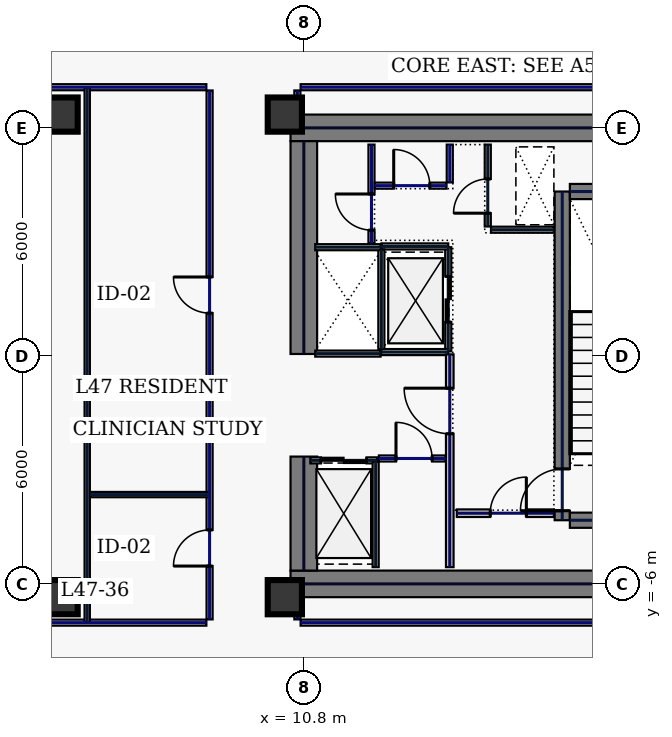
"""IFC4 building model, lengths in metres.
Left out: names, types, materials, properties, quantities, classifications, styles, units other than length and angle.
Written with IfcOpenShell. Run it as: python <this file> out.ifc"""

import sys

from ifc_helpers import new_model, si_unit, direction, frame, frame_2d, origin, origin_2d, place, context, subcontext, project, spatial, rectangle, hollow_rectangle, extrude, element, fill, save


model = new_model("IFC4")
c1 = context("Model", 3, precision=1e-05, world=origin(), true_north=direction((0.0, 1.0)))
c2 = subcontext(c1, "Body", "Model", "MODEL_VIEW")
j1 = project(units=[si_unit("LENGTHUNIT", "METRE"), si_unit("PLANEANGLEUNIT", "RADIAN")], contexts=[c1])
p1 = place(None, origin())
s1 = spatial("IfcSite", under=j1, at=p1, CompositionType="ELEMENT")
p2 = place(p1, origin())
s2 = spatial("IfcBuilding", under=s1, at=p2, CompositionType="ELEMENT")
p3 = place(p2, frame((0.0, 0.0, 204.2)))
s3 = spatial("IfcBuildingStorey", under=s2, at=p3, CompositionType="ELEMENT", Elevation=204.2)
for number, where, z_axis, x_axis in (
    (1, (10.45, 6.0, 0.0), (0.0, 0.0, 1.0), (1.0, 0.0, 0.0)),
    (2, (10.45, -6.0, 0.0), (0.0, 0.0, 1.0), (1.0, 0.0, 0.0)),
):
    element("IfcWall", number, at=place(p3, frame(where, z_axis=z_axis, x_axis=x_axis)), inside=s3, PredefinedType="SHEAR", context=c2, shape_type="SweptSolid", body=[
        extrude(rectangle(XDim=11.55, YDim=0.7, at=frame_2d((5.775, 0.0))), origin(), (0.0, 0.0, 1.0), 3.68),
    ])
p4 = place(p3, frame((10.8, -5.65, 0.0), z_axis=(0.0, 0.0, 1.0), x_axis=(0.0, 1.0, 0.0)))
e3 = element("IfcWall", 3, at=p4, inside=s3, PredefinedType="SHEAR", context=c2, shape_type="SweptSolid", body=[
    extrude(rectangle(XDim=3.0, YDim=0.7, at=frame_2d((1.5, 0.0))), origin(), (0.0, 0.0, 1.0), 3.68),
])
p5 = place(p3, frame((10.8, 0.05, 0.0), z_axis=(0.0, 0.0, 1.0), x_axis=(0.0, 1.0, 0.0)))
e4 = element("IfcWall", 4, at=p5, inside=s3, PredefinedType="SHEAR", context=c2, shape_type="SweptSolid", body=[
    extrude(rectangle(XDim=5.6, YDim=0.7, at=frame_2d((2.8, 0.0))), origin(), (0.0, 0.0, 1.0), 3.68),
])
p6 = place(p3, frame((17.6, -4.325, 0.0), z_axis=(0.0, 0.0, 1.0), x_axis=(0.0, 1.0, 0.0)))
e5 = element("IfcWall", 5, at=p6, inside=s3, PredefinedType="SHEAR", context=c2, shape_type="SweptSolid", body=[
    extrude(rectangle(XDim=8.65, YDim=0.4, at=frame_2d((4.325, 0.0))), origin(), (0.0, 0.0, 1.0), 3.68),
])
p7 = place(p6, frame((0.25, 0.0, 0.0)))
e6 = element("IfcOpeningElement", 6, at=p7, cuts=e5, PredefinedType="OPENING", context=c2, shape_type="SweptSolid", body=[
    extrude(rectangle(XDim=1.1, YDim=2.2, at=frame_2d((0.55, 1.1))), frame((0.0, 0.21, 0.0), z_axis=(0.0, -1.0, 0.0), x_axis=(1.0, 0.0, 0.0)), (0.0, 0.0, 1.0), 0.42),
])
for number, where, z_axis, x_axis in (
    (7, (17.8, -4.325, 0.0), (0.0, 0.0, 1.0), (1.0, 0.0, 0.0)),
    (8, (17.8, 4.325, 0.0), (0.0, 0.0, 1.0), (1.0, 0.0, 0.0)),
):
    element("IfcWall", number, at=place(p3, frame(where, z_axis=z_axis, x_axis=x_axis)), inside=s3, PredefinedType="SHEAR", context=c2, shape_type="SweptSolid", body=[
        extrude(rectangle(XDim=3.4, YDim=0.4, at=frame_2d((1.7, 0.0))), origin(), (0.0, 0.0, 1.0), 3.68),
    ])
for number, where, z_axis, x_axis in (
    (9, (10.3, -6.35, 0.0), (0.0, 0.0, 1.0), (1.0, 0.0, 0.0)),
    (10, (10.3, 6.35, 0.0), (0.0, 0.0, 1.0), (1.0, 0.0, 0.0)),
    (11, (4.4, -6.35, 0.0), (0.0, 0.0, 1.0), (1.0, 0.0, 0.0)),
    (12, (4.4, 6.35, 0.0), (0.0, 0.0, 1.0), (1.0, 0.0, 0.0)),
):
    element("IfcColumn", number, at=place(p3, frame(where, z_axis=z_axis, x_axis=x_axis)), inside=s3, PredefinedType="COLUMN", context=c2, shape_type="SweptSolid", body=[
        extrude(hollow_rectangle(XDim=0.9, YDim=0.9, WallThickness=0.04, at=origin_2d()), origin(), (0.0, 0.0, 1.0), 3.68),
    ])
p8 = place(p3, frame((14.6, 0.12, 0.0), z_axis=(0.0, 0.0, 1.0), x_axis=(0.0, 1.0, 0.0)))
e13 = element("IfcWall", 13, at=p8, inside=s3, PredefinedType="PARTITIONING", context=c2, shape_type="SweptSolid", body=[
    extrude(rectangle(XDim=2.74, YDim=0.16, at=frame_2d((1.37, 0.0))), origin(), (0.0, 0.0, 1.0), 3.68),
])
p9 = place(p8, frame((0.77, 0.0, 0.0)))
e14 = element("IfcOpeningElement", 14, at=p9, cuts=e13, PredefinedType="OPENING", context=c2, shape_type="SweptSolid", body=[
    extrude(rectangle(XDim=1.2, YDim=2.2, at=frame_2d((0.6, 1.1))), frame((0.0, 0.09, 0.0), z_axis=(0.0, -1.0, 0.0), x_axis=(1.0, 0.0, 0.0)), (0.0, 0.0, 1.0), 0.18),
])
for number, where, z_axis, x_axis in (
    (15, (12.84, 0.1, 0.0), (0.0, 0.0, 1.0), (1.0, 0.0, 0.0)),
    (16, (12.84, 2.88, 0.0), (0.0, 0.0, 1.0), (1.0, 0.0, 0.0)),
):
    element("IfcWall", number, at=place(p3, frame(where, z_axis=z_axis, x_axis=x_axis)), inside=s3, PredefinedType="PARTITIONING", context=c2, shape_type="SweptSolid", body=[
        extrude(rectangle(XDim=1.76, YDim=0.16, at=frame_2d((0.88, 0.0))), origin(), (0.0, 0.0, 1.0), 3.68),
    ])
p10 = place(p3, frame((12.84, 0.18, 0.0), z_axis=(0.0, 0.0, 1.0), x_axis=(0.0, 1.0, 0.0)))
e17 = element("IfcWall", 17, at=p10, inside=s3, PredefinedType="PARTITIONING", context=c2, shape_type="SweptSolid", body=[
    extrude(rectangle(XDim=2.62, YDim=0.16, at=frame_2d((1.31, 0.0))), origin(), (0.0, 0.0, 1.0), 3.68),
])
p11 = place(p3, frame((10.97, -2.75, 0.0), z_axis=(0.0, 0.0, 1.0), x_axis=(1.0, 0.0, 0.0)))
e18 = element("IfcWall", 18, at=p11, inside=s3, PredefinedType="PARTITIONING", context=c2, shape_type="SweptSolid", body=[
    extrude(rectangle(XDim=1.76, YDim=0.16, at=frame_2d((0.88, 0.0))), origin(), (0.0, 0.0, 1.0), 3.68),
])
p12 = place(p11, frame((0.28, 0.0, 0.0)))
e19 = element("IfcOpeningElement", 19, at=p12, cuts=e18, PredefinedType="OPENING", context=c2, shape_type="SweptSolid", body=[
    extrude(rectangle(XDim=1.2, YDim=2.2, at=frame_2d((0.6, 1.1))), frame((0.0, 0.09, 0.0), z_axis=(0.0, -1.0, 0.0), x_axis=(1.0, 0.0, 0.0)), (0.0, 0.0, 1.0), 0.18),
])
for number, where, z_axis, x_axis in (
    (20, (11.1, 0.06, 0.0), (0.0, 0.0, 1.0), (1.0, 0.0, 0.0)),
    (21, (11.1, 2.86, 0.0), (0.0, 0.0, 1.0), (1.0, 0.0, 0.0)),
):
    element("IfcWall", number, at=place(p3, frame(where, z_axis=z_axis, x_axis=x_axis)), inside=s3, PredefinedType="PARTITIONING", context=c2, shape_type="SweptSolid", body=[
        extrude(rectangle(XDim=1.72, YDim=0.16, at=frame_2d((0.86, 0.0))), origin(), (0.0, 0.0, 1.0), 3.68),
    ])
p13 = place(p3, frame((15.64, 3.405, 0.0), z_axis=(0.0, 0.0, 1.0), x_axis=(0.0, 1.0, 0.0)))
e22 = element("IfcWall", 22, at=p13, inside=s3, PredefinedType="PARTITIONING", context=c2, shape_type="SweptSolid", body=[
    extrude(rectangle(XDim=2.155, YDim=0.16, at=frame_2d((1.078, 0.0))), origin(), (0.0, 0.0, 1.0), 3.68),
])
p14 = place(p13, frame((0.35, 0.0, 0.0)))
e23 = element("IfcOpeningElement", 23, at=p14, cuts=e22, PredefinedType="OPENING", context=c2, shape_type="SweptSolid", body=[
    extrude(rectangle(XDim=0.9, YDim=2.2, at=frame_2d((0.45, 1.1))), frame((0.0, 0.09, 0.0), z_axis=(0.0, -1.0, 0.0), x_axis=(1.0, 0.0, 0.0)), (0.0, 0.0, 1.0), 0.18),
])
p15 = place(p3, frame((15.725, 3.32, 0.0), z_axis=(0.0, 0.0, 1.0), x_axis=(1.0, 0.0, 0.0)))
e24 = element("IfcWall", 24, at=p15, inside=s3, PredefinedType="PARTITIONING", context=c2, shape_type="SweptSolid", body=[
    extrude(rectangle(XDim=1.655, YDim=0.16, at=frame_2d((0.827, 0.0))), origin(), (0.0, 0.0, 1.0), 3.68),
])
p16 = place(p3, frame((14.825, -4.14, 0.0), z_axis=(0.0, 0.0, 1.0), x_axis=(1.0, 0.0, 0.0)))
e25 = element("IfcWall", 25, at=p16, inside=s3, PredefinedType="SOLIDWALL", context=c2, shape_type="SweptSolid", body=[
    extrude(rectangle(XDim=2.555, YDim=0.2, at=frame_2d((1.277, 0.0))), origin(), (0.0, 0.0, 1.0), 3.68),
])
p17 = place(p16, frame((0.88, 0.0, 0.0)))
e26 = element("IfcOpeningElement", 26, at=p17, cuts=e25, PredefinedType="OPENING", context=c2, shape_type="SweptSolid", body=[
    extrude(rectangle(XDim=0.95, YDim=2.2, at=frame_2d((0.475, 1.1))), frame((0.0, 0.11, 0.0), z_axis=(0.0, -1.0, 0.0), x_axis=(1.0, 0.0, 0.0)), (0.0, 0.0, 1.0), 0.22),
])
p18 = place(p3, frame((12.775, -2.7, 0.0), z_axis=(0.0, 0.0, 1.0), x_axis=(1.0, 0.0, 0.0)))
e27 = element("IfcWall", 27, at=p18, inside=s3, PredefinedType="PARTITIONING", context=c2, shape_type="SweptSolid", body=[
    extrude(rectangle(XDim=1.76, YDim=0.16, at=frame_2d((0.88, 0.0))), origin(), (0.0, 0.0, 1.0), 3.68),
])
p19 = place(p18, frame((0.45, 0.0, 0.0)))
e28 = element("IfcOpeningElement", 28, at=p19, cuts=e27, PredefinedType="OPENING", context=c2, shape_type="SweptSolid", body=[
    extrude(rectangle(XDim=0.95, YDim=2.2, at=frame_2d((0.475, 1.1))), frame((0.0, 0.09, 0.0), z_axis=(0.0, -1.0, 0.0), x_axis=(1.0, 0.0, 0.0)), (0.0, 0.0, 1.0), 0.18),
])
p20 = place(p3, frame((12.69, -5.56, 0.0), z_axis=(0.0, 0.0, 1.0), x_axis=(0.0, 1.0, 0.0)))
e29 = element("IfcWall", 29, at=p20, inside=s3, PredefinedType="PARTITIONING", context=c2, shape_type="SweptSolid", body=[
    extrude(rectangle(XDim=2.775, YDim=0.16, at=frame_2d((1.388, 0.0))), origin(), (0.0, 0.0, 1.0), 3.68),
])
p21 = place(p3, frame((12.58, 2.96, 0.0), z_axis=(0.0, 0.0, 1.0), x_axis=(0.0, 1.0, 0.0)))
e30 = element("IfcWall", 30, at=p21, inside=s3, PredefinedType="PARTITIONING", context=c2, shape_type="SweptSolid", body=[
    extrude(rectangle(XDim=2.6, YDim=0.16, at=frame_2d((1.3, 0.0))), origin(), (0.0, 0.0, 1.0), 3.68),
])
p22 = place(p21, frame((0.35, 0.0, 0.0)))
e31 = element("IfcOpeningElement", 31, at=p22, cuts=e30, PredefinedType="OPENING", context=c2, shape_type="SweptSolid", body=[
    extrude(rectangle(XDim=0.95, YDim=2.2, at=frame_2d((0.475, 1.1))), frame((0.0, 0.09, 0.0), z_axis=(0.0, -1.0, 0.0), x_axis=(1.0, 0.0, 0.0)), (0.0, 0.0, 1.0), 0.18),
])
p23 = place(p3, frame((12.665, 4.48, 0.0), z_axis=(0.0, 0.0, 1.0), x_axis=(1.0, 0.0, 0.0)))
e32 = element("IfcWall", 32, at=p23, inside=s3, PredefinedType="PARTITIONING", context=c2, shape_type="SweptSolid", body=[
    extrude(rectangle(XDim=1.89, YDim=0.16, at=frame_2d((0.945, 0.0))), origin(), (0.0, 0.0, 1.0), 3.68),
])
p24 = place(p23, frame((0.5, 0.0, 0.0)))
e33 = element("IfcOpeningElement", 33, at=p24, cuts=e32, PredefinedType="OPENING", context=c2, shape_type="SweptSolid", body=[
    extrude(rectangle(XDim=0.95, YDim=2.2, at=frame_2d((0.475, 1.1))), frame((0.0, 0.09, 0.0), z_axis=(0.0, -1.0, 0.0), x_axis=(1.0, 0.0, 0.0)), (0.0, 0.0, 1.0), 0.18),
])
p25 = place(p3, frame((14.64, 4.565, 0.0), z_axis=(0.0, 0.0, 1.0), x_axis=(0.0, 1.0, 0.0)))
e34 = element("IfcWall", 34, at=p25, inside=s3, PredefinedType="PARTITIONING", context=c2, shape_type="SweptSolid", body=[
    extrude(rectangle(XDim=0.995, YDim=0.16, at=frame_2d((0.498, 0.0))), origin(), (0.0, 0.0, 1.0), 3.68),
])
p26 = place(p3, frame((14.64, -5.56, 0.0), z_axis=(0.0, 0.0, 1.0), x_axis=(0.0, 1.0, 0.0)))
e35 = element("IfcWall", 35, at=p26, inside=s3, PredefinedType="SOLIDWALL", context=c2, shape_type="SweptSolid", body=[
    extrude(rectangle(XDim=5.6, YDim=0.2, at=frame_2d((2.8, 0.0))), origin(), (0.0, 0.0, 1.0), 3.68),
])
p27 = place(p26, frame((3.51, 0.0, 0.0)))
e36 = element("IfcOpeningElement", 36, at=p27, cuts=e35, PredefinedType="OPENING", context=c2, shape_type="SweptSolid", body=[
    extrude(rectangle(XDim=1.2, YDim=2.2, at=frame_2d((0.6, 1.1))), frame((0.0, 0.11, 0.0), z_axis=(0.0, -1.0, 0.0), x_axis=(1.0, 0.0, 0.0)), (0.0, 0.0, 1.0), 0.22),
])
p28 = place(p3, frame((24.965, 7.07, 0.0), z_axis=(0.0, 0.0, 1.0), x_axis=(-1.0, 0.0, 0.0)))
e37 = element("IfcWall", 37, at=p28, inside=s3, PredefinedType="PARTITIONING", context=c2, shape_type="SweptSolid", body=[
    extrude(rectangle(XDim=14.25, YDim=0.16, at=frame_2d((7.125, 0.0))), origin(), (0.0, 0.0, 1.0), 3.68),
])
p29 = place(p3, frame((10.63, 6.985, 0.0), z_axis=(0.0, 0.0, 1.0), x_axis=(0.0, -1.0, 0.0)))
e38 = element("IfcWall", 38, at=p29, inside=s3, PredefinedType="PARTITIONING", context=c2, shape_type="SweptSolid", body=[
    extrude(rectangle(XDim=0.565, YDim=0.16, at=frame_2d((0.283, 0.0))), origin(), (0.0, 0.0, 1.0), 1.475),
])
p30 = place(p3, frame((10.63, -6.42, 0.0), z_axis=(0.0, 0.0, 1.0), x_axis=(0.0, -1.0, 0.0)))
e39 = element("IfcWall", 39, at=p30, inside=s3, PredefinedType="PARTITIONING", context=c2, shape_type="SweptSolid", body=[
    extrude(rectangle(XDim=0.515, YDim=0.16, at=frame_2d((0.258, 0.0))), origin(), (0.0, 0.0, 1.0), 1.475),
])
p31 = place(p3, frame((10.715, -7.02, 0.0), z_axis=(0.0, 0.0, 1.0), x_axis=(1.0, 0.0, 0.0)))
e40 = element("IfcWall", 40, at=p31, inside=s3, PredefinedType="PARTITIONING", context=c2, shape_type="SweptSolid", body=[
    extrude(rectangle(XDim=14.25, YDim=0.16, at=frame_2d((7.125, 0.0))), origin(), (0.0, 0.0, 1.0), 3.68),
])
for number, where, z_axis, x_axis in (
    (41, (8.235, 7.07, 0.0), (0.0, 0.0, 1.0), (-1.0, 0.0, 0.0)),
    (42, (1.415, -7.02, 0.0), (0.0, 0.0, 1.0), (1.0, 0.0, 0.0)),
):
    element("IfcWall", number, at=place(p3, frame(where, z_axis=z_axis, x_axis=x_axis)), inside=s3, PredefinedType="PARTITIONING", context=c2, shape_type="SweptSolid", body=[
        extrude(rectangle(XDim=6.82, YDim=0.16, at=frame_2d((3.41, 0.0))), origin(), (0.0, 0.0, 1.0), 3.68),
    ])
p32 = place(p3, frame((8.32, -6.935, 0.0), z_axis=(0.0, 0.0, 1.0), x_axis=(0.0, 1.0, 0.0)))
e43 = element("IfcWall", 43, at=p32, inside=s3, PredefinedType="PARTITIONING", context=c2, shape_type="SweptSolid", body=[
    extrude(rectangle(XDim=13.92, YDim=0.16, at=frame_2d((6.96, 0.0))), origin(), (0.0, 0.0, 1.0), 3.68),
])
p33 = place(p32, frame((1.404, 0.0, 0.0)))
e44 = element("IfcOpeningElement", 44, at=p33, cuts=e43, PredefinedType="OPENING", context=c2, shape_type="SweptSolid", body=[
    extrude(rectangle(XDim=0.95, YDim=2.2, at=frame_2d((0.475, 1.1))), frame((0.0, 0.09, 0.0), z_axis=(0.0, -1.0, 0.0), x_axis=(1.0, 0.0, 0.0)), (0.0, 0.0, 1.0), 0.18),
])
p34 = place(p32, frame((8.061, 0.0, 0.0)))
e45 = element("IfcOpeningElement", 45, at=p34, cuts=e43, PredefinedType="OPENING", context=c2, shape_type="SweptSolid", body=[
    extrude(rectangle(XDim=0.95, YDim=2.2, at=frame_2d((0.475, 1.1))), frame((0.0, 0.09, 0.0), z_axis=(0.0, -1.0, 0.0), x_axis=(1.0, 0.0, 0.0)), (0.0, 0.0, 1.0), 0.18),
])
p35 = place(p3, frame((5.1, -7.015, 0.0), z_axis=(0.0, 0.0, 1.0), x_axis=(0.0, 1.0, 0.0)))
e46 = element("IfcWall", 46, at=p35, inside=s3, PredefinedType="PARTITIONING", context=c2, shape_type="SweptSolid", body=[
    extrude(rectangle(XDim=14.08, YDim=0.14, at=frame_2d((7.04, 0.0))), origin(), (0.0, 0.0, 1.0), 3.68),
])
p36 = place(p3, frame((5.175, -3.65, 0.0), z_axis=(0.0, 0.0, 1.0), x_axis=(1.0, 0.0, 0.0)))
e47 = element("IfcWall", 47, at=p36, inside=s3, PredefinedType="PARTITIONING", context=c2, shape_type="SweptSolid", body=[
    extrude(rectangle(XDim=3.14, YDim=0.14, at=frame_2d((1.57, 0.0))), origin(), (0.0, 0.0, 1.0), 3.68),
])
p37 = place(p7, origin())
e48 = element("IfcDoor", 48, at=p37, inside=s3, OperationType="SINGLE_SWING_LEFT", PredefinedType="DOOR", context=c2, shape_type="SweptSolid", body=[
    extrude(rectangle(XDim=1.1, YDim=2.2, at=frame_2d((0.55, 1.1))), frame((0.0, 0.025, 0.0), z_axis=(0.0, -1.0, 0.0), x_axis=(1.0, 0.0, 0.0)), (0.0, 0.0, 1.0), 0.05),
])
fill(e6, e48)
p38 = place(p9, origin())
e49 = element("IfcDoor", 49, at=p38, inside=s3, OperationType="SLIDING_TO_LEFT", PredefinedType="DOOR", context=c2, shape_type="SweptSolid", body=[
    extrude(rectangle(XDim=1.2, YDim=2.2, at=frame_2d((0.6, 1.1))), frame((0.0, 0.025, 0.0), z_axis=(0.0, -1.0, 0.0), x_axis=(1.0, 0.0, 0.0)), (0.0, 0.0, 1.0), 0.05),
])
fill(e14, e49)
p39 = place(p12, origin())
e50 = element("IfcDoor", 50, at=p39, inside=s3, OperationType="SLIDING_TO_LEFT", PredefinedType="DOOR", context=c2, shape_type="SweptSolid", body=[
    extrude(rectangle(XDim=1.2, YDim=2.2, at=frame_2d((0.6, 1.1))), frame((0.0, 0.025, 0.0), z_axis=(0.0, -1.0, 0.0), x_axis=(1.0, 0.0, 0.0)), (0.0, 0.0, 1.0), 0.05),
])
fill(e19, e50)
p40 = place(p14, origin())
e51 = element("IfcDoor", 51, at=p40, inside=s3, OperationType="SINGLE_SWING_LEFT", PredefinedType="DOOR", context=c2, shape_type="SweptSolid", body=[
    extrude(rectangle(XDim=0.9, YDim=2.2, at=frame_2d((0.45, 1.1))), frame((0.0, 0.025, 0.0), z_axis=(0.0, -1.0, 0.0), x_axis=(1.0, 0.0, 0.0)), (0.0, 0.0, 1.0), 0.05),
])
fill(e23, e51)
p41 = place(p17, origin())
e52 = element("IfcDoor", 52, at=p41, inside=s3, OperationType="SINGLE_SWING_RIGHT", PredefinedType="DOOR", context=c2, shape_type="SweptSolid", body=[
    extrude(rectangle(XDim=0.95, YDim=2.2, at=frame_2d((0.475, 1.1))), frame((0.0, 0.025, 0.0), z_axis=(0.0, -1.0, 0.0), x_axis=(1.0, 0.0, 0.0)), (0.0, 0.0, 1.0), 0.05),
])
fill(e26, e52)
p42 = place(p19, origin())
e53 = element("IfcDoor", 53, at=p42, inside=s3, OperationType="SINGLE_SWING_LEFT", PredefinedType="DOOR", context=c2, shape_type="SweptSolid", body=[
    extrude(rectangle(XDim=0.95, YDim=2.2, at=frame_2d((0.475, 1.1))), frame((0.0, 0.025, 0.0), z_axis=(0.0, -1.0, 0.0), x_axis=(1.0, 0.0, 0.0)), (0.0, 0.0, 1.0), 0.05),
])
fill(e28, e53)
p43 = place(p22, origin())
e54 = element("IfcDoor", 54, at=p43, inside=s3, OperationType="SINGLE_SWING_RIGHT", PredefinedType="DOOR", context=c2, shape_type="SweptSolid", body=[
    extrude(rectangle(XDim=0.95, YDim=2.2, at=frame_2d((0.475, 1.1))), frame((0.0, 0.025, 0.0), z_axis=(0.0, -1.0, 0.0), x_axis=(1.0, 0.0, 0.0)), (0.0, 0.0, 1.0), 0.05),
])
fill(e31, e54)
p44 = place(p24, origin())
e55 = element("IfcDoor", 55, at=p44, inside=s3, OperationType="SINGLE_SWING_LEFT", PredefinedType="DOOR", context=c2, shape_type="SweptSolid", body=[
    extrude(rectangle(XDim=0.95, YDim=2.2, at=frame_2d((0.475, 1.1))), frame((0.0, 0.025, 0.0), z_axis=(0.0, -1.0, 0.0), x_axis=(1.0, 0.0, 0.0)), (0.0, 0.0, 1.0), 0.05),
])
fill(e33, e55)
p45 = place(p27, origin())
e56 = element("IfcDoor", 56, at=p45, inside=s3, OperationType="SINGLE_SWING_RIGHT", PredefinedType="DOOR", context=c2, shape_type="SweptSolid", body=[
    extrude(rectangle(XDim=1.2, YDim=2.2, at=frame_2d((0.6, 1.1))), frame((0.0, 0.025, 0.0), z_axis=(0.0, -1.0, 0.0), x_axis=(1.0, 0.0, 0.0)), (0.0, 0.0, 1.0), 0.05),
])
fill(e36, e56)
p46 = place(p33, origin())
e57 = element("IfcDoor", 57, at=p46, inside=s3, OperationType="SINGLE_SWING_LEFT", PredefinedType="DOOR", context=c2, shape_type="SweptSolid", body=[
    extrude(rectangle(XDim=0.95, YDim=2.2, at=frame_2d((0.475, 1.1))), frame((0.0, 0.025, 0.0), z_axis=(0.0, -1.0, 0.0), x_axis=(1.0, 0.0, 0.0)), (0.0, 0.0, 1.0), 0.05),
])
fill(e44, e57)
p47 = place(p34, origin())
e58 = element("IfcDoor", 58, at=p47, inside=s3, OperationType="SINGLE_SWING_RIGHT", PredefinedType="DOOR", context=c2, shape_type="SweptSolid", body=[
    extrude(rectangle(XDim=0.95, YDim=2.2, at=frame_2d((0.475, 1.1))), frame((0.0, 0.025, 0.0), z_axis=(0.0, -1.0, 0.0), x_axis=(1.0, 0.0, 0.0)), (0.0, 0.0, 1.0), 0.05),
])
fill(e45, e58)
save(model, sys.argv[1])
